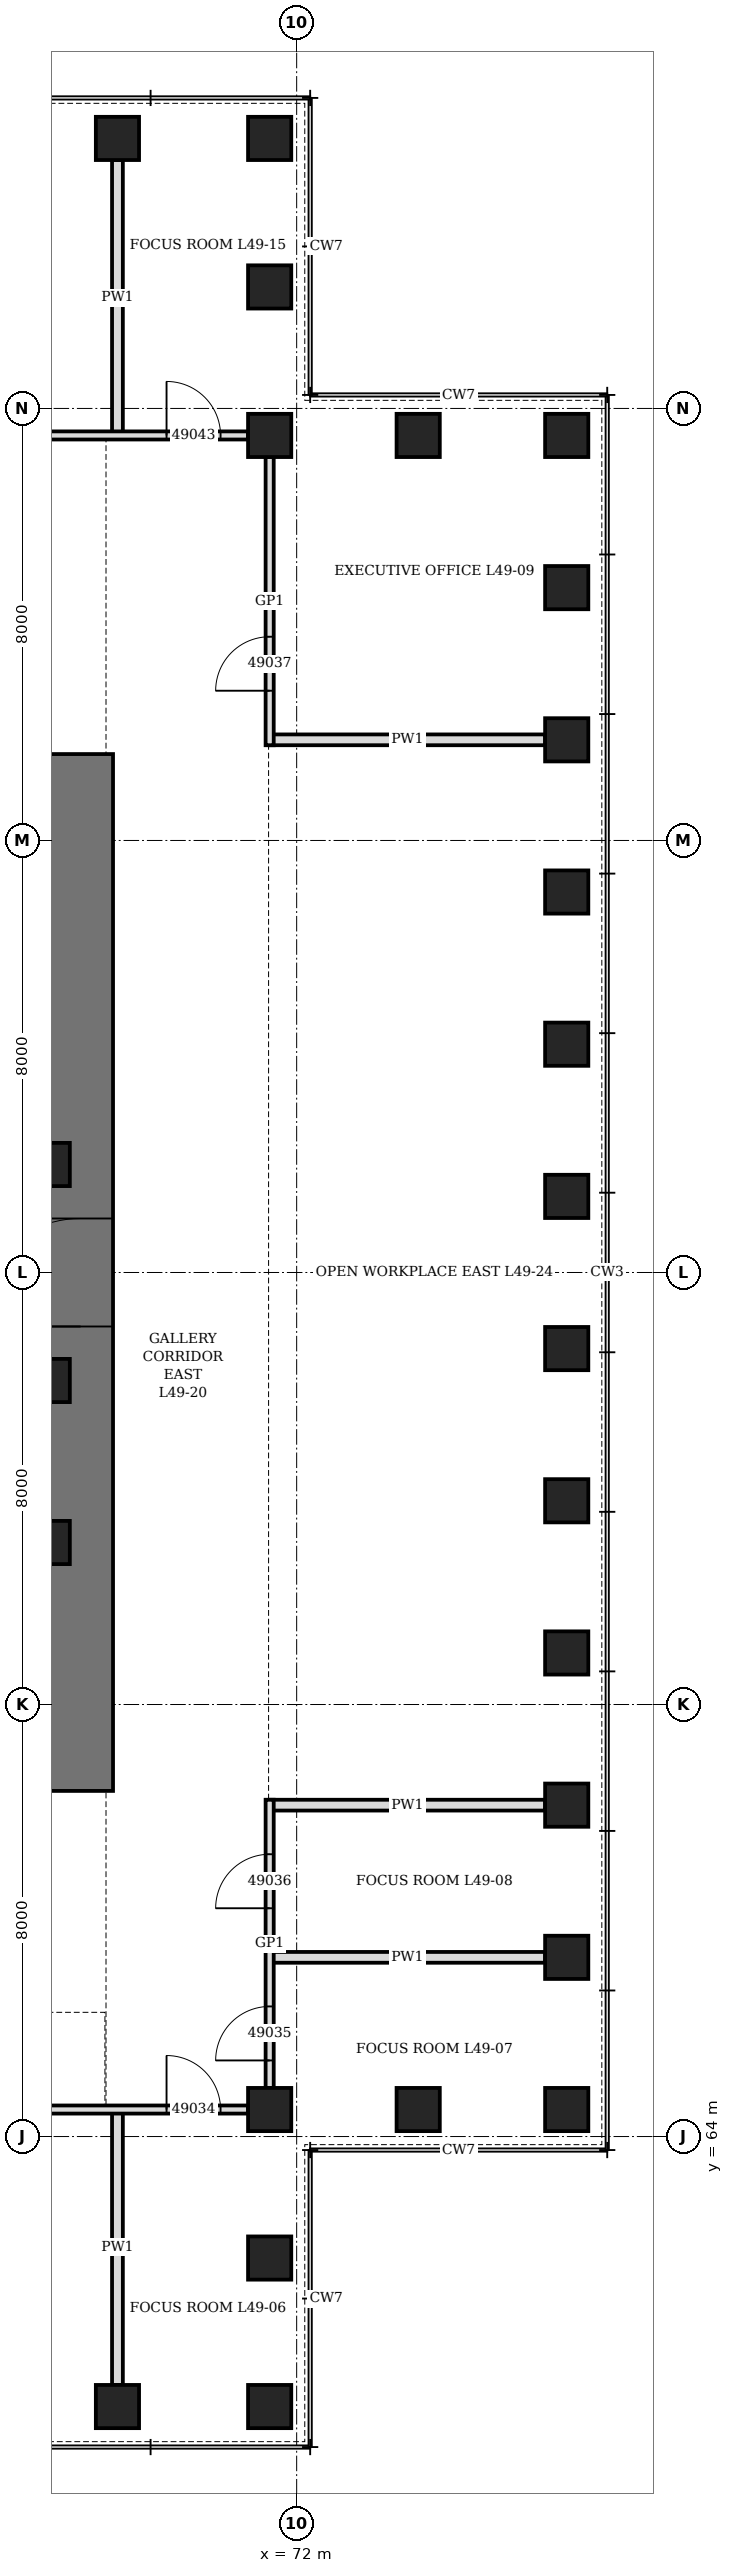
"""IFC4 building model, lengths in metres.
Left out: names, types, materials, properties, quantities, classifications, styles, units other than length and angle.
Written with IfcOpenShell. Run it as: python <this file> out.ifc"""

import sys

from ifc_helpers import new_model, si_unit, direction, frame, frame_2d, origin, origin_2d, place, context, subcontext, project, spatial, rectangle, hollow_rectangle, extrude, element, fill, save


model = new_model("IFC4")
c1 = context("Model", 3, precision=1e-05, world=origin(), true_north=direction((0.0, 1.0)))
c2 = subcontext(c1, "Body", "Model", "MODEL_VIEW")
j1 = project(units=[si_unit("LENGTHUNIT", "METRE"), si_unit("PLANEANGLEUNIT", "RADIAN")], contexts=[c1])
p1 = place(None, origin())
s1 = spatial("IfcSite", under=j1, at=p1, CompositionType="ELEMENT")
p2 = place(p1, origin())
s2 = spatial("IfcBuilding", under=s1, at=p2, CompositionType="ELEMENT")
p3 = place(p2, frame((0.0, 0.0, 219.1)))
s3 = spatial("IfcBuildingStorey", under=s2, at=p3, CompositionType="ELEMENT", Elevation=219.1)
for number, where, z_axis, x_axis in (
    (1, (68.682, 59.0, 0.0), (0.0, 0.0, 1.0), (1.0, 0.0, 0.0)),
    (2, (71.5, 59.0, 0.0), (0.0, 0.0, 1.0), (0.0, 1.0, 0.0)),
    (3, (71.5, 61.75, 0.0), (0.0, 0.0, 1.0), (0.0, 1.0, 0.0)),
    (4, (71.5, 64.5, 0.0), (0.0, 0.0, 1.0), (1.0, 0.0, 0.0)),
    (5, (74.25, 64.5, 0.0), (0.0, 0.0, 1.0), (1.0, 0.0, 0.0)),
    (6, (77.0, 64.5, 0.0), (0.0, 0.0, 1.0), (0.0, 1.0, 0.0)),
    (7, (77.0, 67.318, 0.0), (0.0, 0.0, 1.0), (0.0, 1.0, 0.0)),
    (8, (77.0, 70.136, 0.0), (0.0, 0.0, 1.0), (0.0, 1.0, 0.0)),
    (9, (77.0, 72.955, 0.0), (0.0, 0.0, 1.0), (0.0, 1.0, 0.0)),
    (10, (77.0, 75.773, 0.0), (0.0, 0.0, 1.0), (0.0, 1.0, 0.0)),
    (11, (77.0, 78.591, 0.0), (0.0, 0.0, 1.0), (0.0, 1.0, 0.0)),
    (12, (77.0, 81.409, 0.0), (0.0, 0.0, 1.0), (0.0, 1.0, 0.0)),
    (13, (77.0, 84.227, 0.0), (0.0, 0.0, 1.0), (0.0, 1.0, 0.0)),
    (14, (77.0, 87.045, 0.0), (0.0, 0.0, 1.0), (0.0, 1.0, 0.0)),
    (15, (77.0, 89.864, 0.0), (0.0, 0.0, 1.0), (0.0, 1.0, 0.0)),
    (16, (77.0, 92.682, 0.0), (0.0, 0.0, 1.0), (0.0, 1.0, 0.0)),
    (17, (77.0, 95.5, 0.0), (0.0, 0.0, 1.0), (1.0, 0.0, 0.0)),
    (18, (74.25, 95.5, 0.0), (0.0, 0.0, 1.0), (1.0, 0.0, 0.0)),
    (19, (71.5, 95.5, 0.0), (0.0, 0.0, 1.0), (0.0, 1.0, 0.0)),
    (20, (71.5, 98.25, 0.0), (0.0, 0.0, 1.0), (0.0, 1.0, 0.0)),
    (21, (71.5, 101.0, 0.0), (0.0, 0.0, 1.0), (1.0, 0.0, 0.0)),
    (22, (68.682, 101.0, 0.0), (0.0, 0.0, 1.0), (1.0, 0.0, 0.0)),
):
    element("IfcColumn", number, at=place(p3, frame(where, z_axis=z_axis, x_axis=x_axis)), inside=s3, PredefinedType="COLUMN", context=c2, shape_type="SweptSolid", body=[
        extrude(hollow_rectangle(XDim=0.8, YDim=0.8, WallThickness=0.08, at=origin_2d()), origin(), (0.0, 0.0, 1.0), 4.2),
    ])
p4 = place(p3, frame((68.0, 70.4, 0.0), z_axis=(0.0, 0.0, 1.0), x_axis=(0.0, 1.0, 0.0)))
e23 = element("IfcWall", 23, at=p4, inside=s3, PredefinedType="SHEAR", context=c2, shape_type="SweptSolid", body=[
    extrude(rectangle(XDim=19.2, YDim=1.2, at=frame_2d((9.6, 0.0))), origin(), (0.0, 0.0, 1.0), 4.2),
])
p5 = place(p4, frame((8.6, 0.0, 0.0)))
e24 = element("IfcOpeningElement", 24, at=p5, cuts=e23, PredefinedType="OPENING", context=c2, shape_type="SweptSolid", body=[
    extrude(rectangle(XDim=2.0, YDim=2.4, at=frame_2d((1.0, 1.2))), frame((0.0, 0.61, 0.0), z_axis=(0.0, -1.0, 0.0), x_axis=(1.0, 0.0, 0.0)), (0.0, 0.0, 1.0), 1.22),
])
for number, where, z_axis, x_axis in (
    (25, (67.4, 75.0, 0.0), (0.0, 0.0, 1.0), (1.0, 0.0, 0.0)),
    (26, (67.4, 78.0, 0.0), (0.0, 0.0, 1.0), (1.0, 0.0, 0.0)),
    (27, (67.4, 82.0, 0.0), (0.0, 0.0, 1.0), (1.0, 0.0, 0.0)),
):
    element("IfcColumn", number, at=place(p3, frame(where, z_axis=z_axis, x_axis=x_axis)), inside=s3, PredefinedType="COLUMN", context=c2, shape_type="SweptSolid", body=[
        extrude(hollow_rectangle(XDim=0.8, YDim=0.8, WallThickness=0.1, at=origin_2d()), origin(), (0.0, 0.0, 1.0), 4.2),
    ])
for number, where, z_axis, x_axis in (
    (28, (68.682, 59.4, 0.0), (0.0, 0.0, 1.0), (0.0, 1.0, 0.0)),
    (29, (71.5, 67.318, 0.0), (0.0, 0.0, 1.0), (1.0, 0.0, 0.0)),
    (30, (71.5, 70.136, 0.0), (0.0, 0.0, 1.0), (1.0, 0.0, 0.0)),
    (31, (71.5, 89.864, 0.0), (0.0, 0.0, 1.0), (1.0, 0.0, 0.0)),
    (32, (68.682, 95.5, 0.0), (0.0, 0.0, 1.0), (0.0, 1.0, 0.0)),
):
    element("IfcWall", number, at=place(p3, frame(where, z_axis=z_axis, x_axis=x_axis)), inside=s3, PredefinedType="PARTITIONING", context=c2, shape_type="SweptSolid", body=[
        extrude(rectangle(XDim=5.1, YDim=0.2, at=frame_2d((2.55, 0.0))), origin(), (0.0, 0.0, 1.0), 3.428),
    ])
p6 = place(p3, frame((46.036, 64.5, 0.0), z_axis=(0.0, 0.0, 1.0), x_axis=(1.0, 0.0, 0.0)))
e33 = element("IfcWall", 33, at=p6, inside=s3, PredefinedType="PARTITIONING", context=c2, shape_type="SweptSolid", body=[
    extrude(rectangle(XDim=25.064, YDim=0.15, at=frame_2d((12.532, 0.0))), origin(), (0.0, 0.0, 1.0), 4.04),
])
p7 = place(p6, frame((1.009, 0.0, 0.0)))
e34 = element("IfcOpeningElement", 34, at=p7, cuts=e33, PredefinedType="OPENING", context=c2, shape_type="SweptSolid", body=[
    extrude(rectangle(XDim=1.0, YDim=2.1, at=frame_2d((0.5, 1.05))), frame((0.0, 0.085, 0.0), z_axis=(0.0, -1.0, 0.0), x_axis=(1.0, 0.0, 0.0)), (0.0, 0.0, 1.0), 0.17),
])
p8 = place(p6, frame((6.646, 0.0, 0.0)))
e35 = element("IfcOpeningElement", 35, at=p8, cuts=e33, PredefinedType="OPENING", context=c2, shape_type="SweptSolid", body=[
    extrude(rectangle(XDim=1.0, YDim=2.1, at=frame_2d((0.5, 1.05))), frame((0.0, 0.085, 0.0), z_axis=(0.0, -1.0, 0.0), x_axis=(1.0, 0.0, 0.0)), (0.0, 0.0, 1.0), 0.17),
])
p9 = place(p6, frame((12.282, 0.0, 0.0)))
e36 = element("IfcOpeningElement", 36, at=p9, cuts=e33, PredefinedType="OPENING", context=c2, shape_type="SweptSolid", body=[
    extrude(rectangle(XDim=1.0, YDim=2.1, at=frame_2d((0.5, 1.05))), frame((0.0, 0.085, 0.0), z_axis=(0.0, -1.0, 0.0), x_axis=(1.0, 0.0, 0.0)), (0.0, 0.0, 1.0), 0.17),
])
p10 = place(p6, frame((17.918, 0.0, 0.0)))
e37 = element("IfcOpeningElement", 37, at=p10, cuts=e33, PredefinedType="OPENING", context=c2, shape_type="SweptSolid", body=[
    extrude(rectangle(XDim=1.0, YDim=2.1, at=frame_2d((0.5, 1.05))), frame((0.0, 0.085, 0.0), z_axis=(0.0, -1.0, 0.0), x_axis=(1.0, 0.0, 0.0)), (0.0, 0.0, 1.0), 0.17),
])
p11 = place(p6, frame((23.554, 0.0, 0.0)))
e38 = element("IfcOpeningElement", 38, at=p11, cuts=e33, PredefinedType="OPENING", context=c2, shape_type="SweptSolid", body=[
    extrude(rectangle(XDim=1.0, YDim=2.4, at=frame_2d((0.5, 1.2))), frame((0.0, 0.085, 0.0), z_axis=(0.0, -1.0, 0.0), x_axis=(1.0, 0.0, 0.0)), (0.0, 0.0, 1.0), 0.17),
])
p12 = place(p3, frame((46.036, 95.5, 0.0), z_axis=(0.0, 0.0, 1.0), x_axis=(1.0, 0.0, 0.0)))
e39 = element("IfcWall", 39, at=p12, inside=s3, PredefinedType="PARTITIONING", context=c2, shape_type="SweptSolid", body=[
    extrude(rectangle(XDim=25.064, YDim=0.15, at=frame_2d((12.532, 0.0))), origin(), (0.0, 0.0, 1.0), 4.04),
])
p13 = place(p12, frame((1.009, 0.0, 0.0)))
e40 = element("IfcOpeningElement", 40, at=p13, cuts=e39, PredefinedType="OPENING", context=c2, shape_type="SweptSolid", body=[
    extrude(rectangle(XDim=1.0, YDim=2.1, at=frame_2d((0.5, 1.05))), frame((0.0, 0.085, 0.0), z_axis=(0.0, -1.0, 0.0), x_axis=(1.0, 0.0, 0.0)), (0.0, 0.0, 1.0), 0.17),
])
p14 = place(p12, frame((6.646, 0.0, 0.0)))
e41 = element("IfcOpeningElement", 41, at=p14, cuts=e39, PredefinedType="OPENING", context=c2, shape_type="SweptSolid", body=[
    extrude(rectangle(XDim=1.0, YDim=2.1, at=frame_2d((0.5, 1.05))), frame((0.0, 0.085, 0.0), z_axis=(0.0, -1.0, 0.0), x_axis=(1.0, 0.0, 0.0)), (0.0, 0.0, 1.0), 0.17),
])
p15 = place(p12, frame((12.282, 0.0, 0.0)))
e42 = element("IfcOpeningElement", 42, at=p15, cuts=e39, PredefinedType="OPENING", context=c2, shape_type="SweptSolid", body=[
    extrude(rectangle(XDim=1.0, YDim=2.1, at=frame_2d((0.5, 1.05))), frame((0.0, 0.085, 0.0), z_axis=(0.0, -1.0, 0.0), x_axis=(1.0, 0.0, 0.0)), (0.0, 0.0, 1.0), 0.17),
])
p16 = place(p12, frame((17.918, 0.0, 0.0)))
e43 = element("IfcOpeningElement", 43, at=p16, cuts=e39, PredefinedType="OPENING", context=c2, shape_type="SweptSolid", body=[
    extrude(rectangle(XDim=1.0, YDim=2.1, at=frame_2d((0.5, 1.05))), frame((0.0, 0.085, 0.0), z_axis=(0.0, -1.0, 0.0), x_axis=(1.0, 0.0, 0.0)), (0.0, 0.0, 1.0), 0.17),
])
p17 = place(p12, frame((23.554, 0.0, 0.0)))
e44 = element("IfcOpeningElement", 44, at=p17, cuts=e39, PredefinedType="OPENING", context=c2, shape_type="SweptSolid", body=[
    extrude(rectangle(XDim=1.0, YDim=2.4, at=frame_2d((0.5, 1.2))), frame((0.0, 0.085, 0.0), z_axis=(0.0, -1.0, 0.0), x_axis=(1.0, 0.0, 0.0)), (0.0, 0.0, 1.0), 0.17),
])
p18 = place(p3, frame((71.5, 64.9, 0.0), z_axis=(0.0, 0.0, 1.0), x_axis=(0.0, 1.0, 0.0)))
e45 = element("IfcWall", 45, at=p18, inside=s3, PredefinedType="PARTITIONING", context=c2, shape_type="SweptSolid", body=[
    extrude(rectangle(XDim=5.336, YDim=0.15, at=frame_2d((2.668, 0.0))), origin(), (0.0, 0.0, 1.0), 4.04),
])
p19 = place(p18, frame((0.509, 0.0, 0.0)))
e46 = element("IfcOpeningElement", 46, at=p19, cuts=e45, PredefinedType="OPENING", context=c2, shape_type="SweptSolid", body=[
    extrude(rectangle(XDim=1.0, YDim=2.4, at=frame_2d((0.5, 1.2))), frame((0.0, 0.085, 0.0), z_axis=(0.0, -1.0, 0.0), x_axis=(1.0, 0.0, 0.0)), (0.0, 0.0, 1.0), 0.17),
])
p20 = place(p18, frame((3.327, 0.0, 0.0)))
e47 = element("IfcOpeningElement", 47, at=p20, cuts=e45, PredefinedType="OPENING", context=c2, shape_type="SweptSolid", body=[
    extrude(rectangle(XDim=1.0, YDim=2.4, at=frame_2d((0.5, 1.2))), frame((0.0, 0.085, 0.0), z_axis=(0.0, -1.0, 0.0), x_axis=(1.0, 0.0, 0.0)), (0.0, 0.0, 1.0), 0.17),
])
p21 = place(p3, frame((71.5, 89.764, 0.0), z_axis=(0.0, 0.0, 1.0), x_axis=(0.0, 1.0, 0.0)))
e48 = element("IfcWall", 48, at=p21, inside=s3, PredefinedType="PARTITIONING", context=c2, shape_type="SweptSolid", body=[
    extrude(rectangle(XDim=5.336, YDim=0.15, at=frame_2d((2.668, 0.0))), origin(), (0.0, 0.0, 1.0), 4.04),
])
p22 = place(p21, frame((1.009, 0.0, 0.0)))
e49 = element("IfcOpeningElement", 49, at=p22, cuts=e48, PredefinedType="OPENING", context=c2, shape_type="SweptSolid", body=[
    extrude(rectangle(XDim=1.0, YDim=2.1, at=frame_2d((0.5, 1.05))), frame((0.0, 0.085, 0.0), z_axis=(0.0, -1.0, 0.0), x_axis=(1.0, 0.0, 0.0)), (0.0, 0.0, 1.0), 0.17),
])
p23 = place(p5, origin())
e50 = element("IfcDoor", 50, at=p23, inside=s3, OperationType="DOUBLE_DOOR_SINGLE_SWING", PredefinedType="DOOR", context=c2, shape_type="SweptSolid", body=[
    extrude(rectangle(XDim=2.0, YDim=2.4, at=frame_2d((1.0, 1.2))), frame((0.0, 0.35, 0.0), z_axis=(0.0, -1.0, 0.0), x_axis=(1.0, 0.0, 0.0)), (0.0, 0.0, 1.0), 0.7),
])
fill(e24, e50)
p24 = place(p11, origin())
e51 = element("IfcDoor", 51, at=p24, inside=s3, OperationType="SINGLE_SWING_RIGHT", PredefinedType="DOOR", context=c2, shape_type="SweptSolid", body=[
    extrude(rectangle(XDim=1.0, YDim=2.4, at=frame_2d((0.5, 1.2))), frame((0.0, 0.075, 0.0), z_axis=(0.0, -1.0, 0.0), x_axis=(1.0, 0.0, 0.0)), (0.0, 0.0, 1.0), 0.149),
])
fill(e38, e51)
p25 = place(p19, origin())
e52 = element("IfcDoor", 52, at=p25, inside=s3, OperationType="SINGLE_SWING_RIGHT", PredefinedType="DOOR", context=c2, shape_type="SweptSolid", body=[
    extrude(rectangle(XDim=1.0, YDim=2.4, at=frame_2d((0.5, 1.2))), frame((0.0, 0.075, 0.0), z_axis=(0.0, -1.0, 0.0), x_axis=(1.0, 0.0, 0.0)), (0.0, 0.0, 1.0), 0.149),
])
fill(e46, e52)
p26 = place(p20, origin())
e53 = element("IfcDoor", 53, at=p26, inside=s3, OperationType="SINGLE_SWING_RIGHT", PredefinedType="DOOR", context=c2, shape_type="SweptSolid", body=[
    extrude(rectangle(XDim=1.0, YDim=2.4, at=frame_2d((0.5, 1.2))), frame((0.0, 0.075, 0.0), z_axis=(0.0, -1.0, 0.0), x_axis=(1.0, 0.0, 0.0)), (0.0, 0.0, 1.0), 0.149),
])
fill(e47, e53)
p27 = place(p22, origin())
e54 = element("IfcDoor", 54, at=p27, inside=s3, OperationType="SINGLE_SWING_LEFT", PredefinedType="DOOR", context=c2, shape_type="SweptSolid", body=[
    extrude(rectangle(XDim=1.0, YDim=2.1, at=frame_2d((0.5, 1.05))), frame((0.0, 0.075, 0.0), z_axis=(0.0, -1.0, 0.0), x_axis=(1.0, 0.0, 0.0)), (0.0, 0.0, 1.0), 0.149),
])
fill(e49, e54)
p28 = place(p17, origin())
e55 = element("IfcDoor", 55, at=p28, inside=s3, OperationType="SINGLE_SWING_RIGHT", PredefinedType="DOOR", context=c2, shape_type="SweptSolid", body=[
    extrude(rectangle(XDim=1.0, YDim=2.4, at=frame_2d((0.5, 1.2))), frame((0.0, 0.075, 0.0), z_axis=(0.0, -1.0, 0.0), x_axis=(1.0, 0.0, 0.0)), (0.0, 0.0, 1.0), 0.149),
])
fill(e44, e55)
save(model, sys.argv[1])
